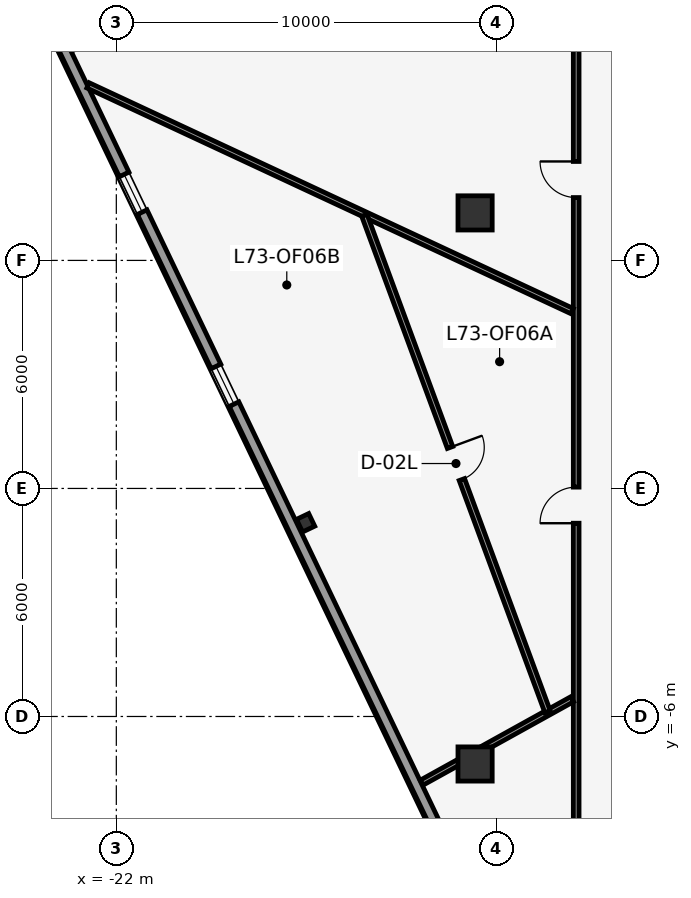
"""IFC4 building model, lengths in metres.
Left out: names, types, materials, properties, quantities, classifications, styles, units other than length and angle.
Written with IfcOpenShell. Run it as: python <this file> out.ifc"""

import sys

from ifc_helpers import new_model, si_unit, direction, frame, frame_2d, origin, origin_2d, place, context, subcontext, project, spatial, rectangle, i_section, extrude, element, fill, save


model = new_model("IFC4")
c1 = context("Model", 3, precision=1e-05, world=origin(), true_north=direction((0.0, 1.0)))
c2 = subcontext(c1, "Body", "Model", "MODEL_VIEW")
j1 = project(units=[si_unit("LENGTHUNIT", "METRE"), si_unit("PLANEANGLEUNIT", "RADIAN")], contexts=[c1])
p1 = place(None, origin())
s1 = spatial("IfcSite", under=j1, at=p1, CompositionType="ELEMENT")
p2 = place(p1, origin())
s2 = spatial("IfcBuilding", under=s1, at=p2, CompositionType="ELEMENT")
p3 = place(p2, frame((0.0, 0.0, 310.6)))
s3 = spatial("IfcBuildingStorey", under=s2, at=p3, CompositionType="ELEMENT", Elevation=310.6)
for number, where, z_axis, x_axis in (
    (1, (-12.56, -7.25, 0.0), (0.0, 0.0, 1.0), (1.0, 0.0, 0.0)),
    (2, (-12.56, 7.25, 0.0), (0.0, 0.0, 1.0), (1.0, 0.0, 0.0)),
):
    element("IfcColumn", number, at=place(p3, frame(where, z_axis=z_axis, x_axis=x_axis)), inside=s3, PredefinedType="COLUMN", context=c2, shape_type="SweptSolid", body=[
        extrude(rectangle(XDim=0.9, YDim=0.9, at=origin_2d()), origin(), (0.0, 0.0, 1.0), 4.1),
    ])
p4 = place(p3, frame((-17.019, -0.903, 0.0), z_axis=(0.0, 0.0, 1.0), x_axis=(-0.431298587031, 0.902209248913, 0.0)))
e3 = element("IfcColumn", 3, at=p4, inside=s3, PredefinedType="COLUMN", context=c2, shape_type="SweptSolid", body=[
    extrude(i_section(OverallWidth=0.368, OverallDepth=0.356, WebThickness=0.011, FlangeThickness=0.018, at=origin_2d()), origin(), (0.0, 0.0, 1.0), 4.1),
])
p5 = place(p3, frame((-4.988, -26.865, 0.0), z_axis=(0.0, 0.0, 1.0), x_axis=(-0.431592936847, 0.902068476815, 0.0)))
e4 = element("IfcWall", 4, at=p5, inside=s3, PredefinedType="STANDARD", context=c2, shape_type="SweptSolid", body=[
    extrude(rectangle(XDim=43.18, YDim=0.28, at=frame_2d((21.59, 0.0))), origin(), (0.0, 0.0, 1.0), 3.85),
])
p6 = place(p5, frame((4.24, 0.0, 0.85)))
e5 = element("IfcOpeningElement", 5, at=p6, cuts=e4, PredefinedType="OPENING", context=c2, shape_type="SweptSolid", body=[
    extrude(rectangle(XDim=1.1, YDim=2.15, at=frame_2d((0.55, 1.075))), frame((0.0, 0.15, 0.0), z_axis=(0.0, -1.0, 0.0), x_axis=(1.0, 0.0, 0.0)), (0.0, 0.0, 1.0), 0.3),
])
p7 = place(p5, frame((9.84, 0.0, 0.85)))
e6 = element("IfcOpeningElement", 6, at=p7, cuts=e4, PredefinedType="OPENING", context=c2, shape_type="SweptSolid", body=[
    extrude(rectangle(XDim=1.1, YDim=2.15, at=frame_2d((0.55, 1.075))), frame((0.0, 0.15, 0.0), z_axis=(0.0, -1.0, 0.0), x_axis=(1.0, 0.0, 0.0)), (0.0, 0.0, 1.0), 0.3),
])
p8 = place(p5, frame((32.24, 0.0, 0.85)))
e7 = element("IfcOpeningElement", 7, at=p8, cuts=e4, PredefinedType="OPENING", context=c2, shape_type="SweptSolid", body=[
    extrude(rectangle(XDim=1.1, YDim=2.15, at=frame_2d((0.55, 1.075))), frame((0.0, 0.15, 0.0), z_axis=(0.0, -1.0, 0.0), x_axis=(1.0, 0.0, 0.0)), (0.0, 0.0, 1.0), 0.3),
])
p9 = place(p5, frame((37.84, 0.0, 0.85)))
e8 = element("IfcOpeningElement", 8, at=p9, cuts=e4, PredefinedType="OPENING", context=c2, shape_type="SweptSolid", body=[
    extrude(rectangle(XDim=1.1, YDim=2.15, at=frame_2d((0.55, 1.075))), frame((0.0, 0.15, 0.0), z_axis=(0.0, -1.0, 0.0), x_axis=(1.0, 0.0, 0.0)), (0.0, 0.0, 1.0), 0.3),
])
p10 = place(p3, frame((-9.9, -9.937, 0.0), z_axis=(0.0, 0.0, 1.0), x_axis=(0.0, 1.0, 0.0)))
e9 = element("IfcWall", 9, at=p10, inside=s3, PredefinedType="PARTITIONING", context=c2, shape_type="SweptSolid", body=[
    extrude(rectangle(XDim=21.787, YDim=0.15, at=frame_2d((10.894, 0.0))), origin(), (0.0, 0.0, 1.0), 3.85),
])
p11 = place(p10, frame((17.591, 0.0, 0.0)))
e10 = element("IfcOpeningElement", 10, at=p11, cuts=e9, PredefinedType="OPENING", context=c2, shape_type="SweptSolid", body=[
    extrude(rectangle(XDim=0.95, YDim=2.15, at=frame_2d((0.475, 1.075))), frame((0.0, 0.085, 0.0), z_axis=(0.0, -1.0, 0.0), x_axis=(1.0, 0.0, 0.0)), (0.0, 0.0, 1.0), 0.17),
])
p12 = place(p10, frame((9.022, 0.0, 0.0)))
e11 = element("IfcOpeningElement", 11, at=p12, cuts=e9, PredefinedType="OPENING", context=c2, shape_type="SweptSolid", body=[
    extrude(rectangle(XDim=0.95, YDim=2.15, at=frame_2d((0.475, 1.075))), frame((0.0, 0.085, 0.0), z_axis=(0.0, -1.0, 0.0), x_axis=(1.0, 0.0, 0.0)), (0.0, 0.0, 1.0), 0.17),
])
p13 = place(p3, frame((-10.005, 4.665, 0.0), z_axis=(0.0, 0.0, 1.0), x_axis=(-0.906304243042, 0.422625861778, 0.0)))
e12 = element("IfcWall", 12, at=p13, inside=s3, PredefinedType="PARTITIONING", context=c2, shape_type="SweptSolid", body=[
    extrude(rectangle(XDim=14.056, YDim=0.15, at=frame_2d((7.028, 0.0))), origin(), (0.0, 0.0, 1.0), 3.85),
])
p14 = place(p3, frame((-10.005, -5.546, 0.0), z_axis=(0.0, 0.0, 1.0), x_axis=(-0.874622222754, -0.48480508193, 0.0)))
e13 = element("IfcWall", 13, at=p14, inside=s3, PredefinedType="PARTITIONING", context=c2, shape_type="SweptSolid", body=[
    extrude(rectangle(XDim=4.529, YDim=0.15, at=frame_2d((2.264, 0.0))), origin(), (0.0, 0.0, 1.0), 3.85),
])
p15 = place(p3, frame((-15.473, 7.188, 0.0), z_axis=(0.0, 0.0, 1.0), x_axis=(0.346159492737, -0.938175679491, 0.0)))
e14 = element("IfcWall", 14, at=p15, inside=s3, PredefinedType="PARTITIONING", context=c2, shape_type="SweptSolid", body=[
    extrude(rectangle(XDim=13.925, YDim=0.15, at=frame_2d((6.962, 0.0))), origin(), (0.0, 0.0, 1.0), 3.85),
])
p16 = place(p15, frame((6.512, 0.0, 0.0)))
e15 = element("IfcOpeningElement", 15, at=p16, cuts=e14, PredefinedType="OPENING", context=c2, shape_type="SweptSolid", body=[
    extrude(rectangle(XDim=0.9, YDim=2.1, at=frame_2d((0.45, 1.05))), frame((0.0, 0.085, 0.0), z_axis=(0.0, -1.0, 0.0), x_axis=(1.0, 0.0, 0.0)), (0.0, 0.0, 1.0), 0.17),
])
p17 = place(p8, origin())
e16 = element("IfcWindow", 16, at=p17, inside=s3, PartitioningType="SINGLE_PANEL", PredefinedType="WINDOW", context=c2, shape_type="SweptSolid", body=[
    extrude(rectangle(XDim=1.1, YDim=2.15, at=frame_2d((0.55, 1.075))), frame((0.0, 0.03, 0.0), z_axis=(0.0, -1.0, 0.0), x_axis=(1.0, 0.0, 0.0)), (0.0, 0.0, 1.0), 0.06),
])
fill(e7, e16)
p18 = place(p9, origin())
e17 = element("IfcWindow", 17, at=p18, inside=s3, PartitioningType="SINGLE_PANEL", PredefinedType="WINDOW", context=c2, shape_type="SweptSolid", body=[
    extrude(rectangle(XDim=1.1, YDim=2.15, at=frame_2d((0.55, 1.075))), frame((0.0, 0.03, 0.0), z_axis=(0.0, -1.0, 0.0), x_axis=(1.0, 0.0, 0.0)), (0.0, 0.0, 1.0), 0.06),
])
fill(e8, e17)
p19 = place(p16, origin())
e18 = element("IfcDoor", 18, at=p19, inside=s3, OperationType="SINGLE_SWING_LEFT", PredefinedType="DOOR", context=c2, shape_type="SweptSolid", body=[
    extrude(rectangle(XDim=0.9, YDim=2.1, at=frame_2d((0.45, 1.05))), frame((0.0, 0.025, 0.0), z_axis=(0.0, -1.0, 0.0), x_axis=(1.0, 0.0, 0.0)), (0.0, 0.0, 1.0), 0.05),
])
fill(e15, e18)
p20 = place(p11, origin())
e19 = element("IfcDoor", 19, at=p20, inside=s3, OperationType="SINGLE_SWING_RIGHT", PredefinedType="DOOR", context=c2, shape_type="SweptSolid", body=[
    extrude(rectangle(XDim=0.95, YDim=2.15, at=frame_2d((0.475, 1.075))), frame((0.0, 0.025, 0.0), z_axis=(0.0, -1.0, 0.0), x_axis=(1.0, 0.0, 0.0)), (0.0, 0.0, 1.0), 0.05),
])
fill(e10, e19)
p21 = place(p12, origin())
e20 = element("IfcDoor", 20, at=p21, inside=s3, OperationType="SINGLE_SWING_LEFT", PredefinedType="DOOR", context=c2, shape_type="SweptSolid", body=[
    extrude(rectangle(XDim=0.95, YDim=2.15, at=frame_2d((0.475, 1.075))), frame((0.0, 0.025, 0.0), z_axis=(0.0, -1.0, 0.0), x_axis=(1.0, 0.0, 0.0)), (0.0, 0.0, 1.0), 0.05),
])
fill(e11, e20)
save(model, sys.argv[1])
